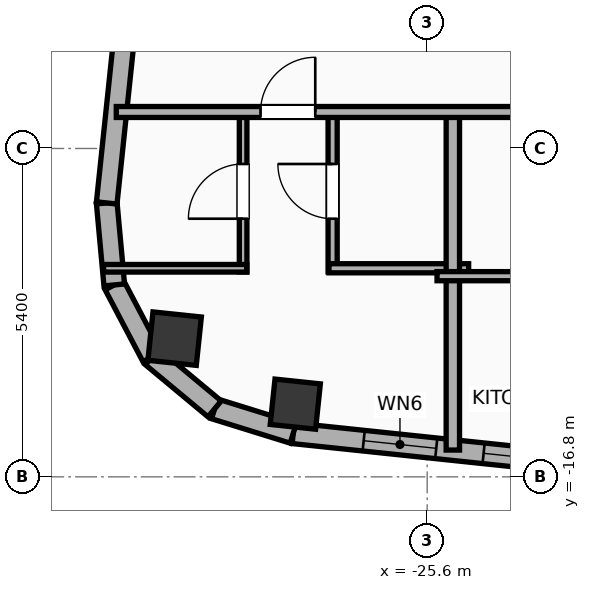
"""IFC4 building model, lengths in metres.
Left out: names, types, materials, properties, quantities, classifications, styles, units other than length and angle.
Written with IfcOpenShell. Run it as: python <this file> out.ifc"""

import sys

from ifc_helpers import new_model, si_unit, direction, frame, frame_2d, origin, origin_2d, place, context, subcontext, project, spatial, rectangle, hollow_rectangle, hollow_circle, extrude, element, fill, save


model = new_model("IFC4")
c1 = context("Model", 3, precision=1e-05, world=origin(), true_north=direction((0.0, 1.0)))
c2 = subcontext(c1, "Body", "Model", "MODEL_VIEW")
j1 = project(units=[si_unit("LENGTHUNIT", "METRE"), si_unit("PLANEANGLEUNIT", "RADIAN")], contexts=[c1])
p1 = place(None, origin())
s1 = spatial("IfcSite", under=j1, at=p1, CompositionType="ELEMENT")
p2 = place(p1, origin())
s2 = spatial("IfcBuilding", under=s1, at=p2, CompositionType="ELEMENT")
p3 = place(p2, frame((0.0, 0.0, 283.4)))
s3 = spatial("IfcBuildingStorey", under=s2, at=p3, CompositionType="ELEMENT", Elevation=283.4)
p4 = place(p3, frame((-27.769, -15.604, 0.0), z_axis=(0.0, 0.0, 1.0), x_axis=(0.994521895368, -0.104528463268, 0.0)))
e1 = element("IfcColumn", 1, at=p4, inside=s3, PredefinedType="COLUMN", context=c2, shape_type="SweptSolid", body=[
    extrude(hollow_rectangle(XDim=0.75, YDim=0.75, WallThickness=0.025, at=origin_2d()), origin(), (0.0, 0.0, 1.0), 3.9),
])
p5 = place(p3, frame((-29.753, -14.527, 0.0), z_axis=(0.0, 0.0, 1.0), x_axis=(0.994521895368, -0.104528463268, 0.0)))
e2 = element("IfcColumn", 2, at=p5, inside=s3, PredefinedType="COLUMN", context=c2, shape_type="SweptSolid", body=[
    extrude(hollow_circle(Radius=0.4, WallThickness=0.028, at=origin_2d()), origin(), (0.0, 0.0, 1.0), 3.9),
])
p6 = place(p3, frame((18.708, -20.972, 0.0), z_axis=(0.0, 0.0, 1.0), x_axis=(-0.994521888554, 0.104528528102, 0.0)))
e3 = element("IfcWall", 3, at=p6, inside=s3, PredefinedType="ELEMENTEDWALL", context=c2, shape_type="SweptSolid", body=[
    extrude(rectangle(XDim=46.766, YDim=0.34, at=frame_2d((23.383, 0.0))), origin(), (0.0, 0.0, 1.0), 3.65),
])
p7 = place(p6, frame((23.833, 0.0, 0.75)))
e4 = element("IfcOpeningElement", 4, at=p7, cuts=e3, PredefinedType="OPENING", context=c2, shape_type="SweptSolid", body=[
    extrude(rectangle(XDim=2.4, YDim=2.1, at=frame_2d((1.2, 1.05))), frame((0.0, 0.18, 0.0), z_axis=(0.0, -1.0, 0.0), x_axis=(1.0, 0.0, 0.0)), (0.0, 0.0, 1.0), 0.36),
])
p8 = place(p6, frame((38.622, 0.0, 0.75)))
e5 = element("IfcOpeningElement", 5, at=p8, cuts=e3, PredefinedType="OPENING", context=c2, shape_type="SweptSolid", body=[
    extrude(rectangle(XDim=2.4, YDim=2.1, at=frame_2d((1.2, 1.05))), frame((0.0, 0.18, 0.0), z_axis=(0.0, -1.0, 0.0), x_axis=(1.0, 0.0, 0.0)), (0.0, 0.0, 1.0), 0.36),
])
p9 = place(p6, frame((44.402, 0.0, 0.75)))
e6 = element("IfcOpeningElement", 6, at=p9, cuts=e3, PredefinedType="OPENING", context=c2, shape_type="SweptSolid", body=[
    extrude(rectangle(XDim=1.2, YDim=2.05, at=frame_2d((0.6, 1.025))), frame((0.0, 0.18, 0.0), z_axis=(0.0, -1.0, 0.0), x_axis=(1.0, 0.0, 0.0)), (0.0, 0.0, 1.0), 0.36),
])
p10 = place(p6, frame((42.419, 0.0, 0.75)))
e7 = element("IfcOpeningElement", 7, at=p10, cuts=e3, PredefinedType="OPENING", context=c2, shape_type="SweptSolid", body=[
    extrude(rectangle(XDim=1.2, YDim=2.05, at=frame_2d((0.6, 1.025))), frame((0.0, 0.18, 0.0), z_axis=(0.0, -1.0, 0.0), x_axis=(1.0, 0.0, 0.0)), (0.0, 0.0, 1.0), 0.36),
])
p11 = place(p6, frame((34.933, 0.0, 0.75)))
e8 = element("IfcOpeningElement", 8, at=p11, cuts=e3, PredefinedType="OPENING", context=c2, shape_type="SweptSolid", body=[
    extrude(rectangle(XDim=1.2, YDim=2.05, at=frame_2d((0.6, 1.025))), frame((0.0, 0.18, 0.0), z_axis=(0.0, -1.0, 0.0), x_axis=(1.0, 0.0, 0.0)), (0.0, 0.0, 1.0), 0.36),
])
p12 = place(p6, frame((28.692, 0.0, 0.75)))
e9 = element("IfcOpeningElement", 9, at=p12, cuts=e3, PredefinedType="OPENING", context=c2, shape_type="SweptSolid", body=[
    extrude(rectangle(XDim=1.2, YDim=2.05, at=frame_2d((0.6, 1.025))), frame((0.0, 0.18, 0.0), z_axis=(0.0, -1.0, 0.0), x_axis=(1.0, 0.0, 0.0)), (0.0, 0.0, 1.0), 0.36),
])
p13 = place(p6, frame((30.957, 0.0, 0.75)))
e10 = element("IfcOpeningElement", 10, at=p13, cuts=e3, PredefinedType="OPENING", context=c2, shape_type="SweptSolid", body=[
    extrude(rectangle(XDim=1.2, YDim=2.05, at=frame_2d((0.6, 1.025))), frame((0.0, 0.18, 0.0), z_axis=(0.0, -1.0, 0.0), x_axis=(1.0, 0.0, 0.0)), (0.0, 0.0, 1.0), 0.36),
])
p14 = place(p6, frame((7.51, 0.0, 0.75)))
e11 = element("IfcOpeningElement", 11, at=p14, cuts=e3, PredefinedType="OPENING", context=c2, shape_type="SweptSolid", body=[
    extrude(rectangle(XDim=1.2, YDim=2.05, at=frame_2d((0.6, 1.025))), frame((0.0, 0.18, 0.0), z_axis=(0.0, -1.0, 0.0), x_axis=(1.0, 0.0, 0.0)), (0.0, 0.0, 1.0), 0.36),
])
p15 = place(p6, frame((4.177, 0.0, 0.75)))
e12 = element("IfcOpeningElement", 12, at=p15, cuts=e3, PredefinedType="OPENING", context=c2, shape_type="SweptSolid", body=[
    extrude(rectangle(XDim=1.2, YDim=2.05, at=frame_2d((0.6, 1.025))), frame((0.0, 0.18, 0.0), z_axis=(0.0, -1.0, 0.0), x_axis=(1.0, 0.0, 0.0)), (0.0, 0.0, 1.0), 0.36),
])
p16 = place(p6, frame((1.378, 0.0, 0.75)))
e13 = element("IfcOpeningElement", 13, at=p16, cuts=e3, PredefinedType="OPENING", context=c2, shape_type="SweptSolid", body=[
    extrude(rectangle(XDim=1.2, YDim=2.05, at=frame_2d((0.6, 1.025))), frame((0.0, 0.18, 0.0), z_axis=(0.0, -1.0, 0.0), x_axis=(1.0, 0.0, 0.0)), (0.0, 0.0, 1.0), 0.36),
])
p17 = place(p6, frame((20.254, 0.0, 0.75)))
e14 = element("IfcOpeningElement", 14, at=p17, cuts=e3, PredefinedType="OPENING", context=c2, shape_type="SweptSolid", body=[
    extrude(rectangle(XDim=1.2, YDim=2.05, at=frame_2d((0.6, 1.025))), frame((0.0, 0.18, 0.0), z_axis=(0.0, -1.0, 0.0), x_axis=(1.0, 0.0, 0.0)), (0.0, 0.0, 1.0), 0.36),
])
p18 = place(p6, frame((16.172, 0.0, 0.75)))
e15 = element("IfcOpeningElement", 15, at=p18, cuts=e3, PredefinedType="OPENING", context=c2, shape_type="SweptSolid", body=[
    extrude(rectangle(XDim=1.2, YDim=2.05, at=frame_2d((0.6, 1.025))), frame((0.0, 0.18, 0.0), z_axis=(0.0, -1.0, 0.0), x_axis=(1.0, 0.0, 0.0)), (0.0, 0.0, 1.0), 0.36),
])
p19 = place(p6, frame((12.11, 0.0, 0.75)))
e16 = element("IfcOpeningElement", 16, at=p19, cuts=e3, PredefinedType="OPENING", context=c2, shape_type="SweptSolid", body=[
    extrude(rectangle(XDim=1.2, YDim=2.05, at=frame_2d((0.6, 1.025))), frame((0.0, 0.18, 0.0), z_axis=(0.0, -1.0, 0.0), x_axis=(1.0, 0.0, 0.0)), (0.0, 0.0, 1.0), 0.36),
])
p20 = place(p3, frame((-27.802, -16.084, 0.0), z_axis=(0.0, 0.0, 1.0), x_axis=(-0.955007802701, 0.296580674994, 0.0)))
e17 = element("IfcWall", 17, at=p20, inside=s3, PredefinedType="ELEMENTEDWALL", context=c2, shape_type="SweptSolid", body=[
    extrude(rectangle(XDim=1.354, YDim=0.34, at=frame_2d((0.677, 0.0))), origin(), (0.0, 0.0, 1.0), 3.65),
])
p21 = place(p3, frame((-29.096, -15.682, 0.0), z_axis=(0.0, 0.0, 1.0), x_axis=(-0.768864427906, 0.639411832469, 0.0)))
e18 = element("IfcWall", 18, at=p21, inside=s3, PredefinedType="ELEMENTEDWALL", context=c2, shape_type="SweptSolid", body=[
    extrude(rectangle(XDim=1.337, YDim=0.34, at=frame_2d((0.668, 0.0))), origin(), (0.0, 0.0, 1.0), 3.65),
])
p22 = place(p3, frame((-30.124, -14.827, 0.0), z_axis=(0.0, 0.0, 1.0), x_axis=(-0.465528132217, 0.885033083062, 0.0)))
e19 = element("IfcWall", 19, at=p22, inside=s3, PredefinedType="ELEMENTEDWALL", context=c2, shape_type="SweptSolid", body=[
    extrude(rectangle(XDim=1.337, YDim=0.34, at=frame_2d((0.668, 0.0))), origin(), (0.0, 0.0, 1.0), 3.65),
])
p23 = place(p3, frame((-30.746, -13.644, 0.0), z_axis=(0.0, 0.0, 1.0), x_axis=(-0.091592370975, 0.995796584438, 0.0)))
e20 = element("IfcWall", 20, at=p23, inside=s3, PredefinedType="ELEMENTEDWALL", context=c2, shape_type="SweptSolid", body=[
    extrude(rectangle(XDim=1.354, YDim=0.34, at=frame_2d((0.677, 0.0))), origin(), (0.0, 0.0, 1.0), 3.65),
])
p24 = place(p3, frame((-30.87, -12.296, 0.0), z_axis=(0.0, 0.0, 1.0), x_axis=(0.104533282919, 0.994521388791, 0.0)))
e21 = element("IfcWall", 21, at=p24, inside=s3, PredefinedType="ELEMENTEDWALL", context=c2, shape_type="SweptSolid", body=[
    extrude(rectangle(XDim=30.366, YDim=0.34, at=frame_2d((15.183, 0.0))), origin(), (0.0, 0.0, 1.0), 3.65),
])
p25 = place(p24, frame((5.842, 0.0, 0.75)))
e22 = element("IfcOpeningElement", 22, at=p25, cuts=e21, PredefinedType="OPENING", context=c2, shape_type="SweptSolid", body=[
    extrude(rectangle(XDim=1.8, YDim=2.1, at=frame_2d((0.9, 1.05))), frame((0.0, 0.18, 0.0), z_axis=(0.0, -1.0, 0.0), x_axis=(1.0, 0.0, 0.0)), (0.0, 0.0, 1.0), 0.36),
])
p26 = place(p24, frame((23.525, 0.0, 0.75)))
e23 = element("IfcOpeningElement", 23, at=p26, cuts=e21, PredefinedType="OPENING", context=c2, shape_type="SweptSolid", body=[
    extrude(rectangle(XDim=1.8, YDim=2.1, at=frame_2d((0.9, 1.05))), frame((0.0, 0.18, 0.0), z_axis=(0.0, -1.0, 0.0), x_axis=(1.0, 0.0, 0.0)), (0.0, 0.0, 1.0), 0.36),
])
p27 = place(p24, frame((27.368, 0.0, 0.75)))
e24 = element("IfcOpeningElement", 24, at=p27, cuts=e21, PredefinedType="OPENING", context=c2, shape_type="SweptSolid", body=[
    extrude(rectangle(XDim=1.2, YDim=2.05, at=frame_2d((0.6, 1.025))), frame((0.0, 0.18, 0.0), z_axis=(0.0, -1.0, 0.0), x_axis=(1.0, 0.0, 0.0)), (0.0, 0.0, 1.0), 0.36),
])
p28 = place(p24, frame((16.487, 0.0, 0.75)))
e25 = element("IfcOpeningElement", 25, at=p28, cuts=e21, PredefinedType="OPENING", context=c2, shape_type="SweptSolid", body=[
    extrude(rectangle(XDim=1.2, YDim=2.05, at=frame_2d((0.6, 1.025))), frame((0.0, 0.18, 0.0), z_axis=(0.0, -1.0, 0.0), x_axis=(1.0, 0.0, 0.0)), (0.0, 0.0, 1.0), 0.36),
])
p29 = place(p3, frame((-28.627, -13.43, 0.0), z_axis=(0.0, 0.0, 1.0), x_axis=(0.0, 1.0, 0.0)))
e26 = element("IfcWall", 26, at=p29, inside=s3, PredefinedType="PARTITIONING", context=c2, shape_type="SweptSolid", body=[
    extrude(rectangle(XDim=2.65, YDim=0.125, at=frame_2d((1.325, 0.0))), origin(), (0.0, 0.0, 1.0), 3.65),
])
p30 = place(p29, frame((0.875, 0.0, 0.0)))
e27 = element("IfcOpeningElement", 27, at=p30, cuts=e26, PredefinedType="OPENING", context=c2, shape_type="SweptSolid", body=[
    extrude(rectangle(XDim=0.9, YDim=2.05, at=frame_2d((0.45, 1.025))), frame((0.0, 0.073, 0.0), z_axis=(0.0, -1.0, 0.0), x_axis=(1.0, 0.0, 0.0)), (0.0, 0.0, 1.0), 0.145),
])
p31 = place(p3, frame((-27.155, -13.43, 0.0), z_axis=(0.0, 0.0, 1.0), x_axis=(0.0, 1.0, 0.0)))
e28 = element("IfcWall", 28, at=p31, inside=s3, PredefinedType="PLUMBINGWALL", context=c2, shape_type="SweptSolid", body=[
    extrude(rectangle(XDim=2.65, YDim=0.15, at=frame_2d((1.325, 0.0))), origin(), (0.0, 0.0, 1.0), 3.65),
])
p32 = place(p31, frame((0.875, 0.0, 0.0)))
e29 = element("IfcOpeningElement", 29, at=p32, cuts=e28, PredefinedType="OPENING", context=c2, shape_type="SweptSolid", body=[
    extrude(rectangle(XDim=0.9, YDim=2.05, at=frame_2d((0.45, 1.025))), frame((0.0, 0.085, 0.0), z_axis=(0.0, -1.0, 0.0), x_axis=(1.0, 0.0, 0.0)), (0.0, 0.0, 1.0), 0.17),
])
p33 = place(p3, frame((-30.922, -13.37, 0.0), z_axis=(0.0, 0.0, 1.0), x_axis=(1.0, 0.0, 0.0)))
e30 = element("IfcWall", 30, at=p33, inside=s3, PredefinedType="PARTITIONING", context=c2, shape_type="SweptSolid", body=[
    extrude(rectangle(XDim=2.355, YDim=0.125, at=frame_2d((1.178, 0.0))), origin(), (0.0, 0.0, 1.0), 3.65),
])
p34 = place(p3, frame((-27.215, -13.37, 0.0), z_axis=(0.0, 0.0, 1.0), x_axis=(1.0, 0.0, 0.0)))
e31 = element("IfcWall", 31, at=p34, inside=s3, PredefinedType="PLUMBINGWALL", context=c2, shape_type="SweptSolid", body=[
    extrude(rectangle(XDim=2.297, YDim=0.15, at=frame_2d((1.148, 0.0))), origin(), (0.0, 0.0, 1.0), 3.65),
])
p35 = place(p3, frame((-25.178, -16.36, 0.0), z_axis=(0.0, 0.0, 1.0), x_axis=(0.0, 1.0, 0.0)))
e32 = element("IfcWall", 32, at=p35, inside=s3, PredefinedType="PARTITIONING", context=c2, shape_type="SweptSolid", body=[
    extrude(rectangle(XDim=5.64, YDim=0.22, at=frame_2d((2.82, 0.0))), origin(), (0.0, 0.0, 1.0), 3.65),
])
p36 = place(p3, frame((-25.438, -13.5, 0.0), z_axis=(0.0, 0.0, 1.0), x_axis=(1.0, 0.0, 0.0)))
e33 = element("IfcWall", 33, at=p36, inside=s3, PredefinedType="PLUMBINGWALL", context=c2, shape_type="SweptSolid", body=[
    extrude(rectangle(XDim=2.55, YDim=0.15, at=frame_2d((1.275, 0.0))), origin(), (0.0, 0.0, 1.0), 3.65),
])
p37 = place(p3, frame((-30.713, -10.8, 0.0), z_axis=(0.0, 0.0, 1.0), x_axis=(1.0, 0.0, 0.0)))
e34 = element("IfcWall", 34, at=p37, inside=s3, PredefinedType="PARTITIONING", context=c2, shape_type="SweptSolid", body=[
    extrude(rectangle(XDim=22.633, YDim=0.18, at=frame_2d((11.316, 0.0))), origin(), (0.0, 0.0, 1.0), 3.65),
])
p38 = place(p37, frame((2.372, 0.0, 0.0)))
e35 = element("IfcOpeningElement", 35, at=p38, cuts=e34, PredefinedType="OPENING", context=c2, shape_type="SweptSolid", body=[
    extrude(rectangle(XDim=0.9, YDim=2.05, at=frame_2d((0.45, 1.025))), frame((0.0, 0.1, 0.0), z_axis=(0.0, -1.0, 0.0), x_axis=(1.0, 0.0, 0.0)), (0.0, 0.0, 1.0), 0.2),
])
p39 = place(p37, frame((8.885, 0.0, 0.0)))
e36 = element("IfcOpeningElement", 36, at=p39, cuts=e34, PredefinedType="OPENING", context=c2, shape_type="SweptSolid", body=[
    extrude(rectangle(XDim=1.15, YDim=2.05, at=frame_2d((0.575, 1.025))), frame((0.0, 0.1, 0.0), z_axis=(0.0, -1.0, 0.0), x_axis=(1.0, 0.0, 0.0)), (0.0, 0.0, 1.0), 0.2),
])
p40 = place(p37, frame((13.811, 0.0, 0.0)))
e37 = element("IfcOpeningElement", 37, at=p40, cuts=e34, PredefinedType="OPENING", context=c2, shape_type="SweptSolid", body=[
    extrude(rectangle(XDim=0.9, YDim=2.05, at=frame_2d((0.45, 1.025))), frame((0.0, 0.1, 0.0), z_axis=(0.0, -1.0, 0.0), x_axis=(1.0, 0.0, 0.0)), (0.0, 0.0, 1.0), 0.2),
])
p41 = place(p37, frame((20.283, 0.0, 0.0)))
e38 = element("IfcOpeningElement", 38, at=p41, cuts=e34, PredefinedType="OPENING", context=c2, shape_type="SweptSolid", body=[
    extrude(rectangle(XDim=1.15, YDim=2.05, at=frame_2d((0.575, 1.025))), frame((0.0, 0.1, 0.0), z_axis=(0.0, -1.0, 0.0), x_axis=(1.0, 0.0, 0.0)), (0.0, 0.0, 1.0), 0.2),
])
p42 = place(p9, origin())
e39 = element("IfcWindow", 39, at=p42, inside=s3, PartitioningType="SINGLE_PANEL", PredefinedType="WINDOW", context=c2, shape_type="SweptSolid", body=[
    extrude(rectangle(XDim=1.2, YDim=2.05, at=frame_2d((0.6, 1.025))), frame((0.0, 0.03, 0.0), z_axis=(0.0, -1.0, 0.0), x_axis=(1.0, 0.0, 0.0)), (0.0, 0.0, 1.0), 0.06),
])
fill(e6, e39)
p43 = place(p10, origin())
e40 = element("IfcWindow", 40, at=p43, inside=s3, PartitioningType="SINGLE_PANEL", PredefinedType="WINDOW", context=c2, shape_type="SweptSolid", body=[
    extrude(rectangle(XDim=1.2, YDim=2.05, at=frame_2d((0.6, 1.025))), frame((0.0, 0.03, 0.0), z_axis=(0.0, -1.0, 0.0), x_axis=(1.0, 0.0, 0.0)), (0.0, 0.0, 1.0), 0.06),
])
fill(e7, e40)
p44 = place(p30, origin())
e41 = element("IfcDoor", 41, at=p44, inside=s3, OperationType="SINGLE_SWING_LEFT", PredefinedType="DOOR", context=c2, shape_type="SweptSolid", body=[
    extrude(rectangle(XDim=0.9, YDim=2.05, at=frame_2d((0.45, 1.025))), frame((0.0, 0.025, 0.0), z_axis=(0.0, -1.0, 0.0), x_axis=(1.0, 0.0, 0.0)), (0.0, 0.0, 1.0), 0.05),
])
fill(e27, e41)
p45 = place(p32, origin())
e42 = element("IfcDoor", 42, at=p45, inside=s3, OperationType="SINGLE_SWING_RIGHT", PredefinedType="DOOR", context=c2, shape_type="SweptSolid", body=[
    extrude(rectangle(XDim=0.9, YDim=2.05, at=frame_2d((0.45, 1.025))), frame((0.0, 0.025, 0.0), z_axis=(0.0, -1.0, 0.0), x_axis=(1.0, 0.0, 0.0)), (0.0, 0.0, 1.0), 0.05),
])
fill(e29, e42)
p46 = place(p38, origin())
e43 = element("IfcDoor", 43, at=p46, inside=s3, OperationType="SINGLE_SWING_RIGHT", PredefinedType="DOOR", context=c2, shape_type="SweptSolid", body=[
    extrude(rectangle(XDim=0.9, YDim=2.05, at=frame_2d((0.45, 1.025))), frame((0.0, 0.025, 0.0), z_axis=(0.0, -1.0, 0.0), x_axis=(1.0, 0.0, 0.0)), (0.0, 0.0, 1.0), 0.05),
])
fill(e35, e43)
save(model, sys.argv[1])
